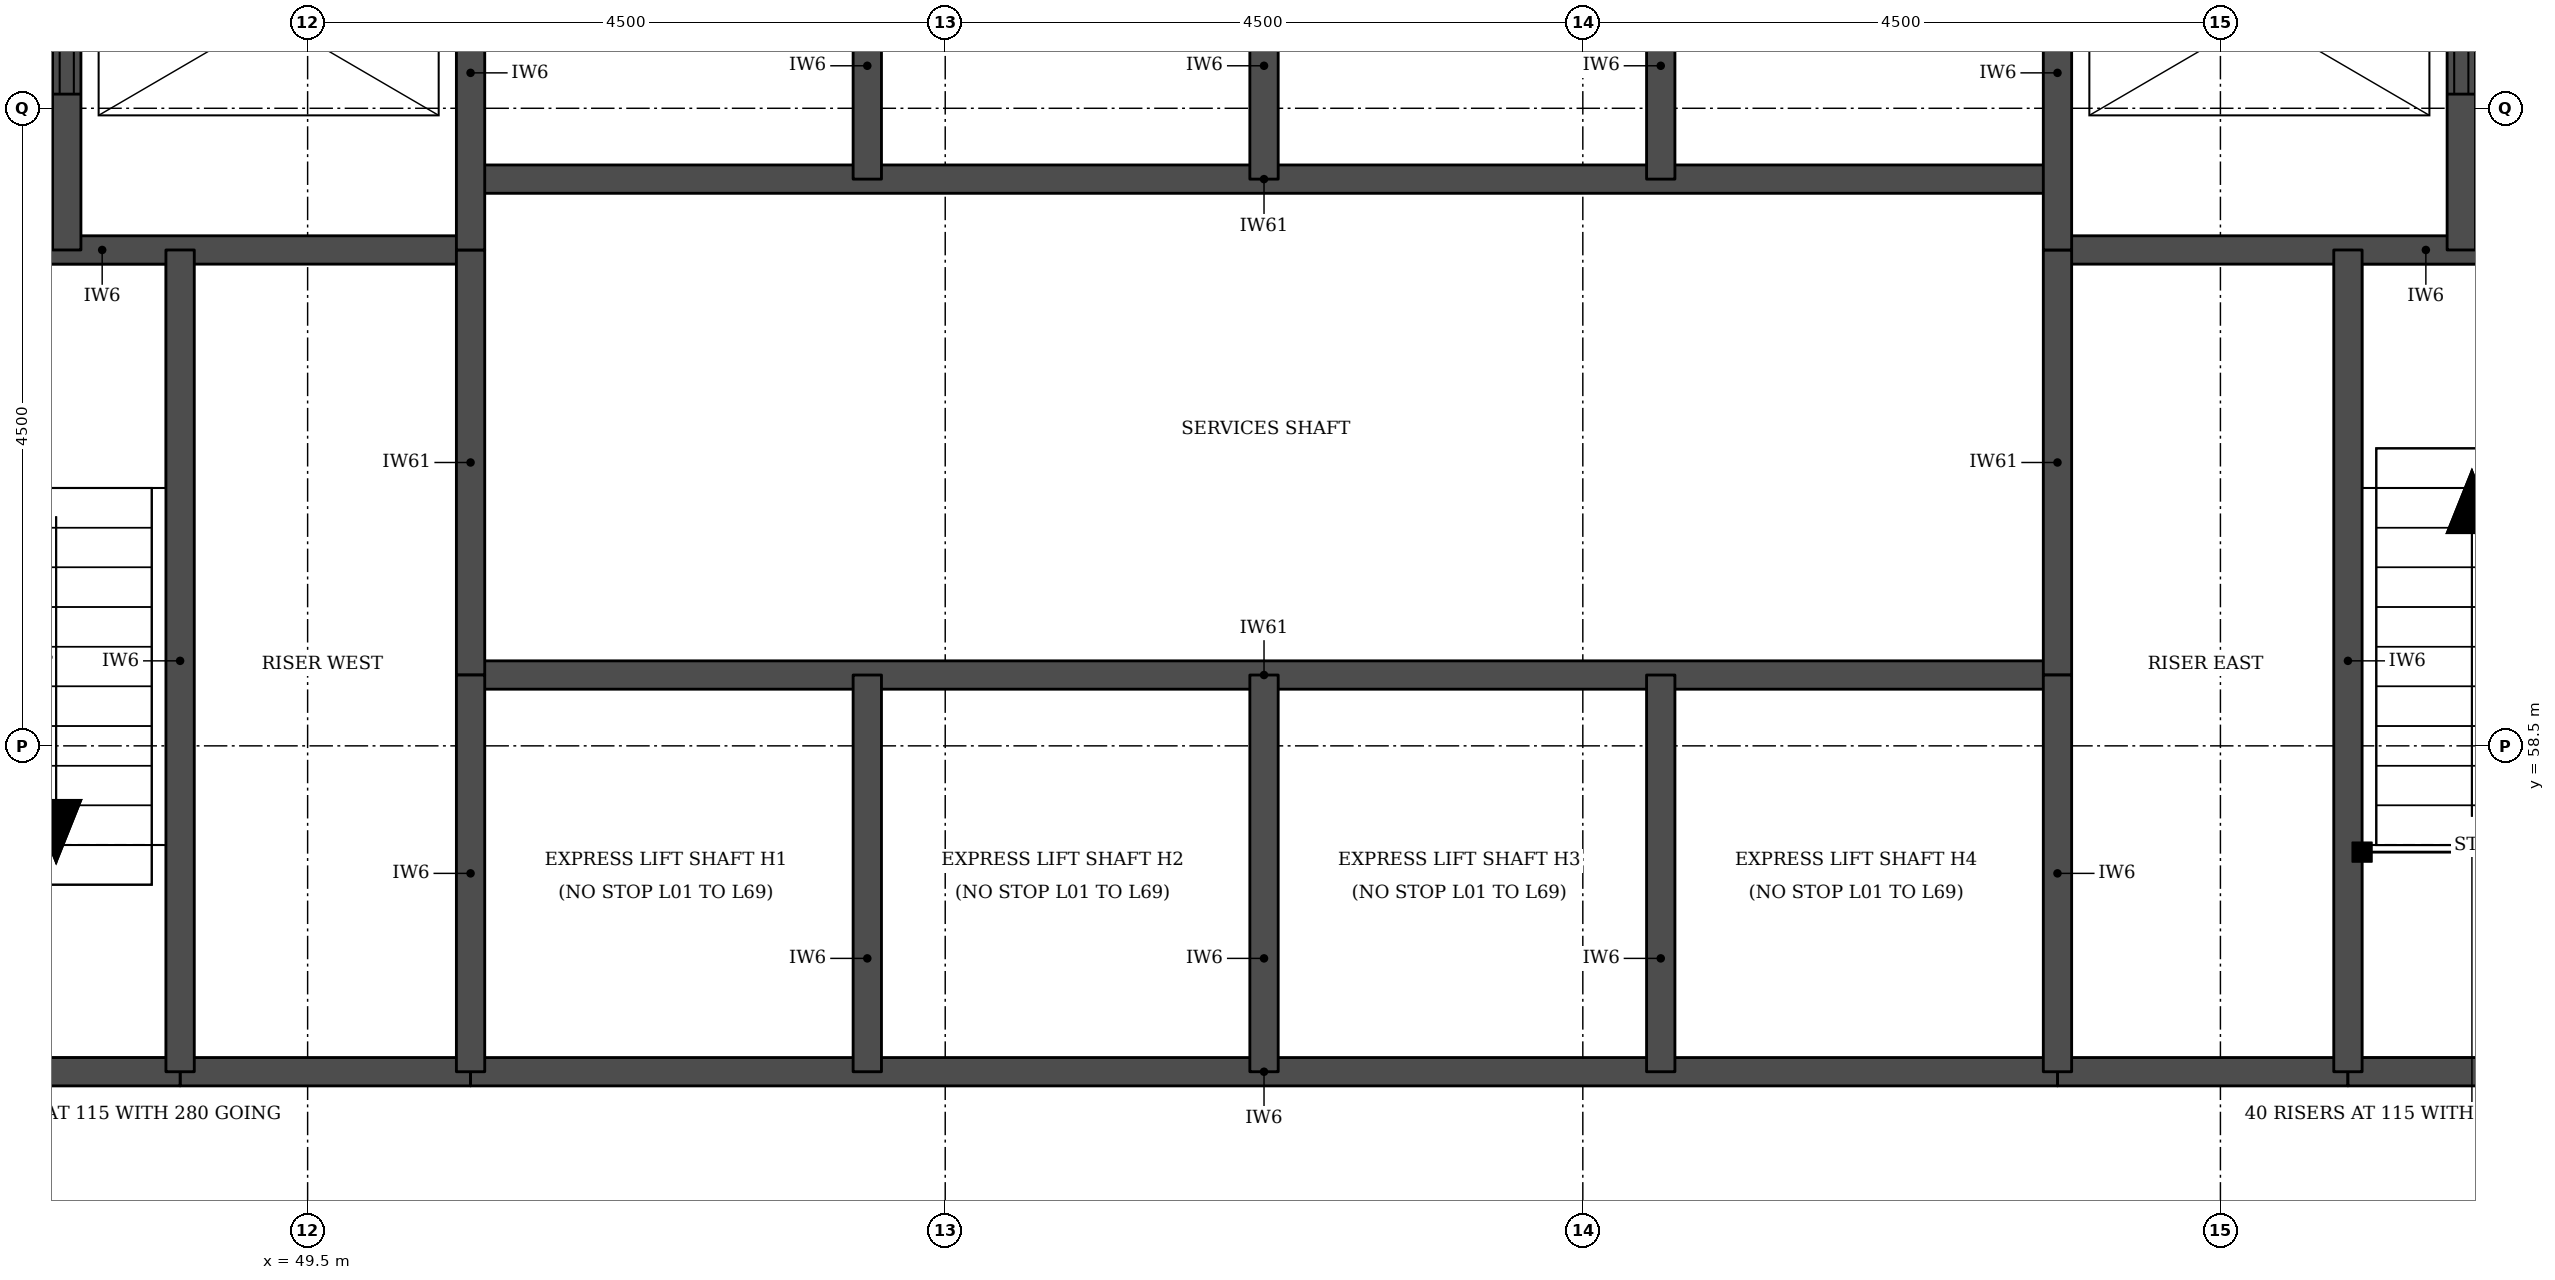
"""IFC4 building model, lengths in metres.
Left out: names, types, materials, properties, quantities, classifications, styles, units other than length and angle.
Written with IfcOpenShell. Run it as: python <this file> out.ifc"""

import sys

from ifc_helpers import new_model, si_unit, direction, frame, frame_2d, origin, place, context, subcontext, project, spatial, rectangle, extrude, element, fill, save


model = new_model("IFC4")
c1 = context("Model", 3, precision=1e-05, world=origin(), true_north=direction((0.0, 1.0)))
c2 = subcontext(c1, "Body", "Model", "MODEL_VIEW")
j1 = project(units=[si_unit("LENGTHUNIT", "METRE"), si_unit("PLANEANGLEUNIT", "RADIAN")], contexts=[c1])
p1 = place(None, origin())
s1 = spatial("IfcSite", under=j1, at=p1, CompositionType="ELEMENT")
p2 = place(p1, origin())
s2 = spatial("IfcBuilding", under=s1, at=p2, CompositionType="ELEMENT")
p3 = place(p2, frame((0.0, 0.0, 74.3)))
s3 = spatial("IfcBuildingStorey", under=s2, at=p3, CompositionType="ELEMENT", Elevation=74.3)
for number, where, z_axis, x_axis in (
    (1, (48.6, 56.2, 0.0), (0.0, 0.0, 1.0), (1.0, 0.0, 0.0)),
    (2, (61.85, 56.2, 0.0), (0.0, 0.0, 1.0), (1.0, 0.0, 0.0)),
):
    element("IfcWall", number, at=place(p3, frame(where, z_axis=z_axis, x_axis=x_axis)), inside=s3, PredefinedType="SOLIDWALL", context=c2, shape_type="SweptSolid", body=[
        extrude(rectangle(XDim=2.05, YDim=0.2, at=frame_2d((1.025, 0.0))), origin(), (0.0, 0.0, 1.0), 4.45),
    ])
p4 = place(p3, frame((45.45, 56.2, 0.0), z_axis=(0.0, 0.0, 1.0), x_axis=(1.0, 0.0, 0.0)))
e3 = element("IfcWall", 3, at=p4, inside=s3, PredefinedType="SOLIDWALL", context=c2, shape_type="SweptSolid", body=[
    extrude(rectangle(XDim=3.15, YDim=0.2, at=frame_2d((1.575, 0.0))), origin(), (0.0, 0.0, 1.0), 4.45),
])
p5 = place(p3, frame((50.65, 56.2, 0.0), z_axis=(0.0, 0.0, 1.0), x_axis=(1.0, 0.0, 0.0)))
e4 = element("IfcWall", 4, at=p5, inside=s3, PredefinedType="SOLIDWALL", context=c2, shape_type="SweptSolid", body=[
    extrude(rectangle(XDim=11.2, YDim=0.2, at=frame_2d((5.6, 0.0))), origin(), (0.0, 0.0, 1.0), 4.45),
])
p6 = place(p3, frame((63.9, 56.2, 0.0), z_axis=(0.0, 0.0, 1.0), x_axis=(1.0, 0.0, 0.0)))
e5 = element("IfcWall", 5, at=p6, inside=s3, PredefinedType="SOLIDWALL", context=c2, shape_type="SweptSolid", body=[
    extrude(rectangle(XDim=3.15, YDim=0.2, at=frame_2d((1.575, 0.0))), origin(), (0.0, 0.0, 1.0), 4.45),
])
p7 = place(p3, frame((50.65, 59.0, 0.0), z_axis=(0.0, 0.0, 1.0), x_axis=(1.0, 0.0, 0.0)))
e6 = element("IfcWall", 6, at=p7, inside=s3, PredefinedType="SOLIDWALL", context=c2, shape_type="SweptSolid", body=[
    extrude(rectangle(XDim=11.2, YDim=0.2, at=frame_2d((5.6, 0.0))), origin(), (0.0, 0.0, 1.0), 4.6),
])
for number, where, z_axis, x_axis in (
    (7, (45.45, 62.0, 0.0), (0.0, 0.0, 1.0), (1.0, 0.0, 0.0)),
    (8, (61.85, 62.0, 0.0), (0.0, 0.0, 1.0), (1.0, 0.0, 0.0)),
):
    element("IfcWall", number, at=place(p3, frame(where, z_axis=z_axis, x_axis=x_axis)), inside=s3, PredefinedType="SOLIDWALL", context=c2, shape_type="SweptSolid", body=[
        extrude(rectangle(XDim=5.2, YDim=0.2, at=frame_2d((2.6, 0.0))), origin(), (0.0, 0.0, 1.0), 4.45),
    ])
p8 = place(p3, frame((50.65, 62.5, 0.0), z_axis=(0.0, 0.0, 1.0), x_axis=(1.0, 0.0, 0.0)))
e9 = element("IfcWall", 9, at=p8, inside=s3, PredefinedType="SOLIDWALL", context=c2, shape_type="SweptSolid", body=[
    extrude(rectangle(XDim=11.2, YDim=0.2, at=frame_2d((5.6, 0.0))), origin(), (0.0, 0.0, 1.0), 4.6),
])
p9 = place(p3, frame((47.8, 62.0, 0.0), z_axis=(0.0, 0.0, 1.0), x_axis=(0.0, 1.0, 0.0)))
e10 = element("IfcWall", 10, at=p9, inside=s3, PredefinedType="SOLIDWALL", context=c2, shape_type="SweptSolid", body=[
    extrude(rectangle(XDim=3.3, YDim=0.2, at=frame_2d((1.65, 0.0))), origin(), (0.0, 0.0, 1.0), 4.45),
])
p10 = place(p9, frame((1.1, 0.0, 0.0)))
e11 = element("IfcOpeningElement", 11, at=p10, cuts=e10, PredefinedType="OPENING", context=c2, shape_type="SweptSolid", body=[
    extrude(rectangle(XDim=1.1, YDim=2.1, at=frame_2d((0.55, 1.05))), frame((0.0, 0.11, 0.0), z_axis=(0.0, -1.0, 0.0), x_axis=(1.0, 0.0, 0.0)), (0.0, 0.0, 1.0), 0.22),
])
p11 = place(p3, frame((48.6, 56.2, 0.0), z_axis=(0.0, 0.0, 1.0), x_axis=(0.0, 1.0, 0.0)))
e12 = element("IfcWall", 12, at=p11, inside=s3, PredefinedType="SOLIDWALL", context=c2, shape_type="SweptSolid", body=[
    extrude(rectangle(XDim=5.8, YDim=0.2, at=frame_2d((2.9, 0.0))), origin(), (0.0, 0.0, 1.0), 4.45),
])
p12 = place(p3, frame((50.65, 59.0, 0.0), z_axis=(0.0, 0.0, 1.0), x_axis=(0.0, 1.0, 0.0)))
e13 = element("IfcWall", 13, at=p12, inside=s3, PredefinedType="SOLIDWALL", context=c2, shape_type="SweptSolid", body=[
    extrude(rectangle(XDim=3.0, YDim=0.2, at=frame_2d((1.5, 0.0))), origin(), (0.0, 0.0, 1.0), 4.6),
])
p13 = place(p3, frame((50.65, 56.2, 0.0), z_axis=(0.0, 0.0, 1.0), x_axis=(0.0, 1.0, 0.0)))
e14 = element("IfcWall", 14, at=p13, inside=s3, PredefinedType="SOLIDWALL", context=c2, shape_type="SweptSolid", body=[
    extrude(rectangle(XDim=2.8, YDim=0.2, at=frame_2d((1.4, 0.0))), origin(), (0.0, 0.0, 1.0), 4.45),
])
p14 = place(p3, frame((50.65, 62.0, 0.0), z_axis=(0.0, 0.0, 1.0), x_axis=(0.0, 1.0, 0.0)))
e15 = element("IfcWall", 15, at=p14, inside=s3, PredefinedType="SOLIDWALL", context=c2, shape_type="SweptSolid", body=[
    extrude(rectangle(XDim=3.3, YDim=0.2, at=frame_2d((1.65, 0.0))), origin(), (0.0, 0.0, 1.0), 4.45),
])
for number, where, z_axis, x_axis in (
    (16, (53.45, 56.2, 0.0), (0.0, 0.0, 1.0), (0.0, 1.0, 0.0)),
    (17, (53.45, 62.5, 0.0), (0.0, 0.0, 1.0), (0.0, 1.0, 0.0)),
    (18, (56.25, 56.2, 0.0), (0.0, 0.0, 1.0), (0.0, 1.0, 0.0)),
    (19, (56.25, 62.5, 0.0), (0.0, 0.0, 1.0), (0.0, 1.0, 0.0)),
    (20, (59.05, 56.2, 0.0), (0.0, 0.0, 1.0), (0.0, 1.0, 0.0)),
    (21, (59.05, 62.5, 0.0), (0.0, 0.0, 1.0), (0.0, 1.0, 0.0)),
):
    element("IfcWall", number, at=place(p3, frame(where, z_axis=z_axis, x_axis=x_axis)), inside=s3, PredefinedType="SOLIDWALL", context=c2, shape_type="SweptSolid", body=[
        extrude(rectangle(XDim=2.8, YDim=0.2, at=frame_2d((1.4, 0.0))), origin(), (0.0, 0.0, 1.0), 4.45),
    ])
p15 = place(p3, frame((61.85, 59.0, 0.0), z_axis=(0.0, 0.0, 1.0), x_axis=(0.0, 1.0, 0.0)))
e22 = element("IfcWall", 22, at=p15, inside=s3, PredefinedType="SOLIDWALL", context=c2, shape_type="SweptSolid", body=[
    extrude(rectangle(XDim=3.0, YDim=0.2, at=frame_2d((1.5, 0.0))), origin(), (0.0, 0.0, 1.0), 4.6),
])
p16 = place(p3, frame((61.85, 56.2, 0.0), z_axis=(0.0, 0.0, 1.0), x_axis=(0.0, 1.0, 0.0)))
e23 = element("IfcWall", 23, at=p16, inside=s3, PredefinedType="SOLIDWALL", context=c2, shape_type="SweptSolid", body=[
    extrude(rectangle(XDim=2.8, YDim=0.2, at=frame_2d((1.4, 0.0))), origin(), (0.0, 0.0, 1.0), 4.45),
])
p17 = place(p3, frame((61.85, 62.0, 0.0), z_axis=(0.0, 0.0, 1.0), x_axis=(0.0, 1.0, 0.0)))
e24 = element("IfcWall", 24, at=p17, inside=s3, PredefinedType="SOLIDWALL", context=c2, shape_type="SweptSolid", body=[
    extrude(rectangle(XDim=3.3, YDim=0.2, at=frame_2d((1.65, 0.0))), origin(), (0.0, 0.0, 1.0), 4.45),
])
p18 = place(p3, frame((63.9, 56.2, 0.0), z_axis=(0.0, 0.0, 1.0), x_axis=(0.0, 1.0, 0.0)))
e25 = element("IfcWall", 25, at=p18, inside=s3, PredefinedType="SOLIDWALL", context=c2, shape_type="SweptSolid", body=[
    extrude(rectangle(XDim=5.8, YDim=0.2, at=frame_2d((2.9, 0.0))), origin(), (0.0, 0.0, 1.0), 4.45),
])
p19 = place(p3, frame((64.7, 62.0, 0.0), z_axis=(0.0, 0.0, 1.0), x_axis=(0.0, 1.0, 0.0)))
e26 = element("IfcWall", 26, at=p19, inside=s3, PredefinedType="SOLIDWALL", context=c2, shape_type="SweptSolid", body=[
    extrude(rectangle(XDim=3.3, YDim=0.2, at=frame_2d((1.65, 0.0))), origin(), (0.0, 0.0, 1.0), 4.45),
])
p20 = place(p19, frame((1.1, 0.0, 0.0)))
e27 = element("IfcOpeningElement", 27, at=p20, cuts=e26, PredefinedType="OPENING", context=c2, shape_type="SweptSolid", body=[
    extrude(rectangle(XDim=1.1, YDim=2.1, at=frame_2d((0.55, 1.05))), frame((0.0, 0.11, 0.0), z_axis=(0.0, -1.0, 0.0), x_axis=(1.0, 0.0, 0.0)), (0.0, 0.0, 1.0), 0.22),
])
p21 = place(p10, origin())
e28 = element("IfcDoor", 28, at=p21, inside=s3, OperationType="DOUBLE_DOOR_SLIDING", PredefinedType="DOOR", context=c2, shape_type="SweptSolid", body=[
    extrude(rectangle(XDim=1.1, YDim=2.1, at=frame_2d((0.55, 1.05))), frame((0.0, 0.025, 0.0), z_axis=(0.0, -1.0, 0.0), x_axis=(1.0, 0.0, 0.0)), (0.0, 0.0, 1.0), 0.05),
])
fill(e11, e28)
p22 = place(p20, origin())
e29 = element("IfcDoor", 29, at=p22, inside=s3, OperationType="DOUBLE_DOOR_SLIDING", PredefinedType="DOOR", context=c2, shape_type="SweptSolid", body=[
    extrude(rectangle(XDim=1.1, YDim=2.1, at=frame_2d((0.55, 1.05))), frame((0.0, 0.025, 0.0), z_axis=(0.0, -1.0, 0.0), x_axis=(1.0, 0.0, 0.0)), (0.0, 0.0, 1.0), 0.05),
])
fill(e27, e29)
save(model, sys.argv[1])
